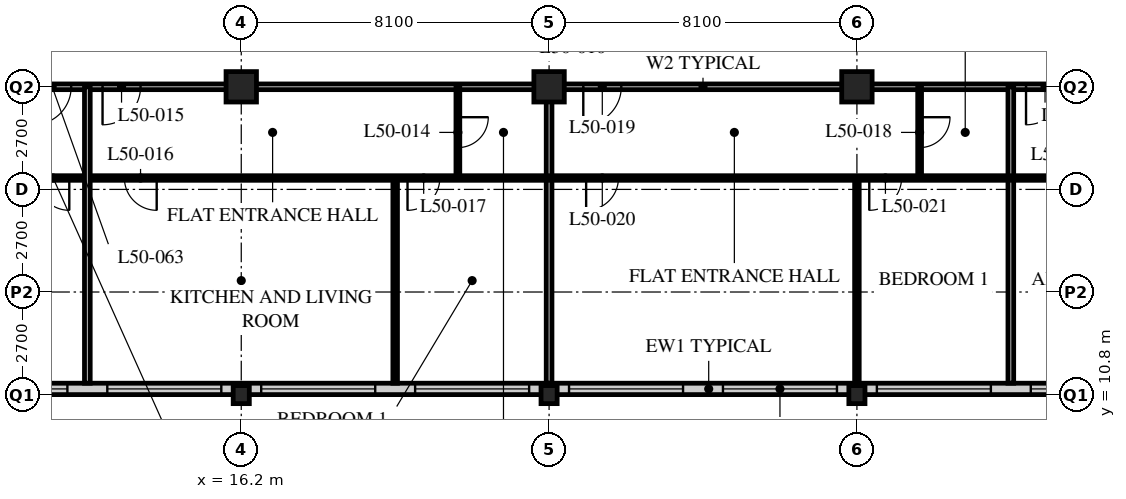
"""IFC4 building model, lengths in metres.
Left out: names, types, materials, properties, quantities, classifications, styles, units other than length and angle.
Written with IfcOpenShell. Run it as: python <this file> out.ifc"""

import sys

from ifc_helpers import new_model, si_unit, direction, frame, frame_2d, origin, origin_2d, place, context, subcontext, project, spatial, rectangle, hollow_rectangle, i_section, extrude, element, fill, save


model = new_model("IFC4")
c1 = context("Model", 3, precision=1e-05, world=origin(), true_north=direction((0.0, 1.0)))
c2 = subcontext(c1, "Body", "Model", "MODEL_VIEW")
j1 = project(units=[si_unit("LENGTHUNIT", "METRE"), si_unit("PLANEANGLEUNIT", "RADIAN")], contexts=[c1])
p1 = place(None, origin())
s1 = spatial("IfcSite", under=j1, at=p1, CompositionType="ELEMENT")
p2 = place(p1, origin())
s2 = spatial("IfcBuilding", under=s1, at=p2, CompositionType="ELEMENT")
p3 = place(p2, frame((0.0, 0.0, 195.6)))
s3 = spatial("IfcBuildingStorey", under=s2, at=p3, CompositionType="ELEMENT", Elevation=195.6)
p4 = place(p3, frame((16.2, 10.8, 0.0), z_axis=(0.0, 0.0, 1.0), x_axis=(1.0, 0.0, 0.0)))
e1 = element("IfcColumn", 1, at=p4, inside=s3, PredefinedType="COLUMN", context=c2, shape_type="SweptSolid", body=[
    extrude(i_section(OverallWidth=0.424, OverallDepth=0.475, WebThickness=0.048, FlangeThickness=0.077, FilletRadius=0.015, at=origin_2d()), origin(), (0.0, 0.0, 1.0), 3.6),
])
p5 = place(p3, frame((16.2, 18.9, 0.0), z_axis=(0.0, 0.0, 1.0), x_axis=(1.0, 0.0, 0.0)))
e2 = element("IfcColumn", 2, at=p5, inside=s3, PredefinedType="COLUMN", context=c2, shape_type="SweptSolid", body=[
    extrude(hollow_rectangle(XDim=0.8, YDim=0.8, WallThickness=0.08, at=origin_2d()), origin(), (0.0, 0.0, 1.0), 3.6),
])
p6 = place(p3, frame((24.3, 10.8, 0.0), z_axis=(0.0, 0.0, 1.0), x_axis=(1.0, 0.0, 0.0)))
e3 = element("IfcColumn", 3, at=p6, inside=s3, PredefinedType="COLUMN", context=c2, shape_type="SweptSolid", body=[
    extrude(i_section(OverallWidth=0.424, OverallDepth=0.475, WebThickness=0.048, FlangeThickness=0.077, FilletRadius=0.015, at=origin_2d()), origin(), (0.0, 0.0, 1.0), 3.6),
])
p7 = place(p3, frame((24.3, 18.9, 0.0), z_axis=(0.0, 0.0, 1.0), x_axis=(1.0, 0.0, 0.0)))
e4 = element("IfcColumn", 4, at=p7, inside=s3, PredefinedType="COLUMN", context=c2, shape_type="SweptSolid", body=[
    extrude(hollow_rectangle(XDim=0.8, YDim=0.8, WallThickness=0.08, at=origin_2d()), origin(), (0.0, 0.0, 1.0), 3.6),
])
p8 = place(p3, frame((32.4, 10.8, 0.0), z_axis=(0.0, 0.0, 1.0), x_axis=(1.0, 0.0, 0.0)))
e5 = element("IfcColumn", 5, at=p8, inside=s3, PredefinedType="COLUMN", context=c2, shape_type="SweptSolid", body=[
    extrude(i_section(OverallWidth=0.424, OverallDepth=0.475, WebThickness=0.048, FlangeThickness=0.077, FilletRadius=0.015, at=origin_2d()), origin(), (0.0, 0.0, 1.0), 3.6),
])
p9 = place(p3, frame((32.4, 18.9, 0.0), z_axis=(0.0, 0.0, 1.0), x_axis=(1.0, 0.0, 0.0)))
e6 = element("IfcColumn", 6, at=p9, inside=s3, PredefinedType="COLUMN", context=c2, shape_type="SweptSolid", body=[
    extrude(hollow_rectangle(XDim=0.8, YDim=0.8, WallThickness=0.08, at=origin_2d()), origin(), (0.0, 0.0, 1.0), 3.6),
])
p10 = place(p3, frame((8.4, 10.95, 0.0), z_axis=(0.0, 0.0, 1.0), x_axis=(1.0, 0.0, 0.0)))
e7 = element("IfcWall", 7, at=p10, inside=s3, PredefinedType="SOLIDWALL", context=c2, shape_type="SweptSolid", body=[
    extrude(rectangle(XDim=40.2, YDim=0.3, at=frame_2d((20.1, 0.0))), origin(), (0.0, 0.0, 1.0), 3.39),
])
p11 = place(p10, frame((0.225, 0.0, 0.6)))
e8 = element("IfcOpeningElement", 8, at=p11, cuts=e7, PredefinedType="OPENING", context=c2, shape_type="SweptSolid", body=[
    extrude(rectangle(XDim=3.0, YDim=2.4, at=frame_2d((1.5, 1.2))), frame((0.0, 0.16, 0.0), z_axis=(0.0, -1.0, 0.0), x_axis=(1.0, 0.0, 0.0)), (0.0, 0.0, 1.0), 0.32),
])
p12 = place(p10, frame((4.275, 0.0, 0.6)))
e9 = element("IfcOpeningElement", 9, at=p12, cuts=e7, PredefinedType="OPENING", context=c2, shape_type="SweptSolid", body=[
    extrude(rectangle(XDim=3.0, YDim=2.4, at=frame_2d((1.5, 1.2))), frame((0.0, 0.16, 0.0), z_axis=(0.0, -1.0, 0.0), x_axis=(1.0, 0.0, 0.0)), (0.0, 0.0, 1.0), 0.32),
])
p13 = place(p10, frame((8.325, 0.0, 0.6)))
e10 = element("IfcOpeningElement", 10, at=p13, cuts=e7, PredefinedType="OPENING", context=c2, shape_type="SweptSolid", body=[
    extrude(rectangle(XDim=3.0, YDim=2.4, at=frame_2d((1.5, 1.2))), frame((0.0, 0.16, 0.0), z_axis=(0.0, -1.0, 0.0), x_axis=(1.0, 0.0, 0.0)), (0.0, 0.0, 1.0), 0.32),
])
p14 = place(p10, frame((12.375, 0.0, 0.6)))
e11 = element("IfcOpeningElement", 11, at=p14, cuts=e7, PredefinedType="OPENING", context=c2, shape_type="SweptSolid", body=[
    extrude(rectangle(XDim=3.0, YDim=2.4, at=frame_2d((1.5, 1.2))), frame((0.0, 0.16, 0.0), z_axis=(0.0, -1.0, 0.0), x_axis=(1.0, 0.0, 0.0)), (0.0, 0.0, 1.0), 0.32),
])
p15 = place(p10, frame((16.425, 0.0, 0.6)))
e12 = element("IfcOpeningElement", 12, at=p15, cuts=e7, PredefinedType="OPENING", context=c2, shape_type="SweptSolid", body=[
    extrude(rectangle(XDim=3.0, YDim=2.4, at=frame_2d((1.5, 1.2))), frame((0.0, 0.16, 0.0), z_axis=(0.0, -1.0, 0.0), x_axis=(1.0, 0.0, 0.0)), (0.0, 0.0, 1.0), 0.32),
])
p16 = place(p10, frame((20.475, 0.0, 0.6)))
e13 = element("IfcOpeningElement", 13, at=p16, cuts=e7, PredefinedType="OPENING", context=c2, shape_type="SweptSolid", body=[
    extrude(rectangle(XDim=3.0, YDim=2.4, at=frame_2d((1.5, 1.2))), frame((0.0, 0.16, 0.0), z_axis=(0.0, -1.0, 0.0), x_axis=(1.0, 0.0, 0.0)), (0.0, 0.0, 1.0), 0.32),
])
p17 = place(p10, frame((24.525, 0.0, 0.6)))
e14 = element("IfcOpeningElement", 14, at=p17, cuts=e7, PredefinedType="OPENING", context=c2, shape_type="SweptSolid", body=[
    extrude(rectangle(XDim=3.0, YDim=2.4, at=frame_2d((1.5, 1.2))), frame((0.0, 0.16, 0.0), z_axis=(0.0, -1.0, 0.0), x_axis=(1.0, 0.0, 0.0)), (0.0, 0.0, 1.0), 0.32),
])
p18 = place(p10, frame((28.575, 0.0, 0.6)))
e15 = element("IfcOpeningElement", 15, at=p18, cuts=e7, PredefinedType="OPENING", context=c2, shape_type="SweptSolid", body=[
    extrude(rectangle(XDim=3.0, YDim=2.4, at=frame_2d((1.5, 1.2))), frame((0.0, 0.16, 0.0), z_axis=(0.0, -1.0, 0.0), x_axis=(1.0, 0.0, 0.0)), (0.0, 0.0, 1.0), 0.32),
])
p19 = place(p10, frame((32.625, 0.0, 0.6)))
e16 = element("IfcOpeningElement", 16, at=p19, cuts=e7, PredefinedType="OPENING", context=c2, shape_type="SweptSolid", body=[
    extrude(rectangle(XDim=3.0, YDim=2.4, at=frame_2d((1.5, 1.2))), frame((0.0, 0.16, 0.0), z_axis=(0.0, -1.0, 0.0), x_axis=(1.0, 0.0, 0.0)), (0.0, 0.0, 1.0), 0.32),
])
p20 = place(p10, frame((36.675, 0.0, 0.6)))
e17 = element("IfcOpeningElement", 17, at=p20, cuts=e7, PredefinedType="OPENING", context=c2, shape_type="SweptSolid", body=[
    extrude(rectangle(XDim=3.0, YDim=2.4, at=frame_2d((1.5, 1.2))), frame((0.0, 0.16, 0.0), z_axis=(0.0, -1.0, 0.0), x_axis=(1.0, 0.0, 0.0)), (0.0, 0.0, 1.0), 0.32),
])
p21 = place(p3, frame((8.1, 18.9, 0.0), z_axis=(0.0, 0.0, 1.0), x_axis=(1.0, 0.0, 0.0)))
e18 = element("IfcWall", 18, at=p21, inside=s3, PredefinedType="PARTITIONING", context=c2, shape_type="SweptSolid", body=[
    extrude(rectangle(XDim=40.5, YDim=0.15, at=frame_2d((20.25, 0.0))), origin(), (0.0, 0.0, 1.0), 2.778),
])
p22 = place(p21, frame((4.45, 0.0, 0.0)))
e19 = element("IfcOpeningElement", 19, at=p22, cuts=e18, PredefinedType="OPENING", context=c2, shape_type="SweptSolid", body=[
    extrude(rectangle(XDim=1.0, YDim=2.1, at=frame_2d((0.5, 1.05))), frame((0.0, 0.085, 0.0), z_axis=(0.0, -1.0, 0.0), x_axis=(1.0, 0.0, 0.0)), (0.0, 0.0, 1.0), 0.17),
])
p23 = place(p21, frame((17.1, 0.0, 0.0)))
e20 = element("IfcOpeningElement", 20, at=p23, cuts=e18, PredefinedType="OPENING", context=c2, shape_type="SweptSolid", body=[
    extrude(rectangle(XDim=1.0, YDim=2.1, at=frame_2d((0.5, 1.05))), frame((0.0, 0.085, 0.0), z_axis=(0.0, -1.0, 0.0), x_axis=(1.0, 0.0, 0.0)), (0.0, 0.0, 1.0), 0.17),
])
p24 = place(p21, frame((28.75, 0.0, 0.0)))
e21 = element("IfcOpeningElement", 21, at=p24, cuts=e18, PredefinedType="OPENING", context=c2, shape_type="SweptSolid", body=[
    extrude(rectangle(XDim=1.0, YDim=2.1, at=frame_2d((0.5, 1.05))), frame((0.0, 0.085, 0.0), z_axis=(0.0, -1.0, 0.0), x_axis=(1.0, 0.0, 0.0)), (0.0, 0.0, 1.0), 0.17),
])
p25 = place(p21, frame((2.625, 0.0, 0.0)))
e22 = element("IfcOpeningElement", 22, at=p25, cuts=e18, PredefinedType="OPENING", context=c2, shape_type="SweptSolid", body=[
    extrude(rectangle(XDim=1.0, YDim=2.1, at=frame_2d((0.5, 1.05))), frame((0.0, 0.085, 0.0), z_axis=(0.0, -1.0, 0.0), x_axis=(1.0, 0.0, 0.0)), (0.0, 0.0, 1.0), 0.17),
])
p26 = place(p21, frame((36.875, 0.0, 0.0)))
e23 = element("IfcOpeningElement", 23, at=p26, cuts=e18, PredefinedType="OPENING", context=c2, shape_type="SweptSolid", body=[
    extrude(rectangle(XDim=1.0, YDim=2.1, at=frame_2d((0.5, 1.05))), frame((0.0, 0.085, 0.0), z_axis=(0.0, -1.0, 0.0), x_axis=(1.0, 0.0, 0.0)), (0.0, 0.0, 1.0), 0.17),
])
p27 = place(p3, frame((21.9, 18.9, 0.0), z_axis=(0.0, 0.0, 1.0), x_axis=(0.0, -1.0, 0.0)))
e24 = element("IfcWall", 24, at=p27, inside=s3, PredefinedType="PARTITIONING", context=c2, shape_type="SweptSolid", body=[
    extrude(rectangle(XDim=2.4, YDim=0.1, at=frame_2d((1.2, 0.0))), origin(), (0.0, 0.0, 1.0), 3.39),
])
p28 = place(p27, frame((0.8, 0.0, 0.0)))
e25 = element("IfcOpeningElement", 25, at=p28, cuts=e24, PredefinedType="OPENING", context=c2, shape_type="SweptSolid", body=[
    extrude(rectangle(XDim=0.8, YDim=2.1, at=frame_2d((0.4, 1.05))), frame((0.0, 0.06, 0.0), z_axis=(0.0, -1.0, 0.0), x_axis=(1.0, 0.0, 0.0)), (0.0, 0.0, 1.0), 0.12),
])
p29 = place(p3, frame((20.25, 16.5, 0.0), z_axis=(0.0, 0.0, 1.0), x_axis=(0.0, -1.0, 0.0)))
e26 = element("IfcWall", 26, at=p29, inside=s3, PredefinedType="PARTITIONING", context=c2, shape_type="SweptSolid", body=[
    extrude(rectangle(XDim=5.4, YDim=0.12, at=frame_2d((2.7, 0.0))), origin(), (0.0, 0.0, 1.0), 3.39),
])
p30 = place(p3, frame((24.3, 18.9, 0.0), z_axis=(0.0, 0.0, 1.0), x_axis=(0.0, -1.0, 0.0)))
e27 = element("IfcWall", 27, at=p30, inside=s3, PredefinedType="PARTITIONING", context=c2, shape_type="SweptSolid", body=[
    extrude(rectangle(XDim=7.8, YDim=0.15, at=frame_2d((3.9, 0.0))), origin(), (0.0, 0.0, 1.0), 2.778),
])
p31 = place(p3, frame((34.05, 18.9, 0.0), z_axis=(0.0, 0.0, 1.0), x_axis=(0.0, -1.0, 0.0)))
e28 = element("IfcWall", 28, at=p31, inside=s3, PredefinedType="PARTITIONING", context=c2, shape_type="SweptSolid", body=[
    extrude(rectangle(XDim=2.4, YDim=0.1, at=frame_2d((1.2, 0.0))), origin(), (0.0, 0.0, 1.0), 3.39),
])
p32 = place(p31, frame((0.8, 0.0, 0.0)))
e29 = element("IfcOpeningElement", 29, at=p32, cuts=e28, PredefinedType="OPENING", context=c2, shape_type="SweptSolid", body=[
    extrude(rectangle(XDim=0.8, YDim=2.1, at=frame_2d((0.4, 1.05))), frame((0.0, 0.06, 0.0), z_axis=(0.0, -1.0, 0.0), x_axis=(1.0, 0.0, 0.0)), (0.0, 0.0, 1.0), 0.12),
])
p33 = place(p3, frame((32.4, 16.5, 0.0), z_axis=(0.0, 0.0, 1.0), x_axis=(0.0, -1.0, 0.0)))
e30 = element("IfcWall", 30, at=p33, inside=s3, PredefinedType="PARTITIONING", context=c2, shape_type="SweptSolid", body=[
    extrude(rectangle(XDim=5.4, YDim=0.12, at=frame_2d((2.7, 0.0))), origin(), (0.0, 0.0, 1.0), 2.778),
])
p34 = place(p3, frame((36.45, 18.9, 0.0), z_axis=(0.0, 0.0, 1.0), x_axis=(0.0, -1.0, 0.0)))
e31 = element("IfcWall", 31, at=p34, inside=s3, PredefinedType="PARTITIONING", context=c2, shape_type="SweptSolid", body=[
    extrude(rectangle(XDim=7.8, YDim=0.15, at=frame_2d((3.9, 0.0))), origin(), (0.0, 0.0, 1.0), 3.39),
])
p35 = place(p3, frame((8.1, 16.5, 0.0), z_axis=(0.0, 0.0, 1.0), x_axis=(1.0, 0.0, 0.0)))
e32 = element("IfcWall", 32, at=p35, inside=s3, PredefinedType="PARTITIONING", context=c2, shape_type="SweptSolid", body=[
    extrude(rectangle(XDim=40.5, YDim=0.12, at=frame_2d((20.25, 0.0))), origin(), (0.0, 0.0, 1.0), 3.39),
])
p36 = place(p35, frame((5.025, 0.0, 0.0)))
e33 = element("IfcOpeningElement", 33, at=p36, cuts=e32, PredefinedType="OPENING", context=c2, shape_type="SweptSolid", body=[
    extrude(rectangle(XDim=0.85, YDim=2.1, at=frame_2d((0.425, 1.05))), frame((0.0, 0.07, 0.0), z_axis=(0.0, -1.0, 0.0), x_axis=(1.0, 0.0, 0.0)), (0.0, 0.0, 1.0), 0.14),
])
p37 = place(p35, frame((12.475, 0.0, 0.0)))
e34 = element("IfcOpeningElement", 34, at=p37, cuts=e32, PredefinedType="OPENING", context=c2, shape_type="SweptSolid", body=[
    extrude(rectangle(XDim=0.85, YDim=2.1, at=frame_2d((0.425, 1.05))), frame((0.0, 0.07, 0.0), z_axis=(0.0, -1.0, 0.0), x_axis=(1.0, 0.0, 0.0)), (0.0, 0.0, 1.0), 0.14),
])
p38 = place(p35, frame((17.175, 0.0, 0.0)))
e35 = element("IfcOpeningElement", 35, at=p38, cuts=e32, PredefinedType="OPENING", context=c2, shape_type="SweptSolid", body=[
    extrude(rectangle(XDim=0.85, YDim=2.1, at=frame_2d((0.425, 1.05))), frame((0.0, 0.07, 0.0), z_axis=(0.0, -1.0, 0.0), x_axis=(1.0, 0.0, 0.0)), (0.0, 0.0, 1.0), 0.14),
])
p39 = place(p35, frame((24.625, 0.0, 0.0)))
e36 = element("IfcOpeningElement", 36, at=p39, cuts=e32, PredefinedType="OPENING", context=c2, shape_type="SweptSolid", body=[
    extrude(rectangle(XDim=0.85, YDim=2.1, at=frame_2d((0.425, 1.05))), frame((0.0, 0.07, 0.0), z_axis=(0.0, -1.0, 0.0), x_axis=(1.0, 0.0, 0.0)), (0.0, 0.0, 1.0), 0.14),
])
p40 = place(p35, frame((29.325, 0.0, 0.0)))
e37 = element("IfcOpeningElement", 37, at=p40, cuts=e32, PredefinedType="OPENING", context=c2, shape_type="SweptSolid", body=[
    extrude(rectangle(XDim=0.85, YDim=2.1, at=frame_2d((0.425, 1.05))), frame((0.0, 0.07, 0.0), z_axis=(0.0, -1.0, 0.0), x_axis=(1.0, 0.0, 0.0)), (0.0, 0.0, 1.0), 0.14),
])
p41 = place(p35, frame((32.725, 0.0, 0.0)))
e38 = element("IfcOpeningElement", 38, at=p41, cuts=e32, PredefinedType="OPENING", context=c2, shape_type="SweptSolid", body=[
    extrude(rectangle(XDim=0.85, YDim=2.1, at=frame_2d((0.425, 1.05))), frame((0.0, 0.07, 0.0), z_axis=(0.0, -1.0, 0.0), x_axis=(1.0, 0.0, 0.0)), (0.0, 0.0, 1.0), 0.14),
])
p42 = place(p35, frame((2.725, 0.0, 0.0)))
e39 = element("IfcOpeningElement", 39, at=p42, cuts=e32, PredefinedType="OPENING", context=c2, shape_type="SweptSolid", body=[
    extrude(rectangle(XDim=0.85, YDim=2.1, at=frame_2d((0.425, 1.05))), frame((0.0, 0.07, 0.0), z_axis=(0.0, -1.0, 0.0), x_axis=(1.0, 0.0, 0.0)), (0.0, 0.0, 1.0), 0.14),
])
p43 = place(p35, frame((36.925, 0.0, 0.0)))
e40 = element("IfcOpeningElement", 40, at=p43, cuts=e32, PredefinedType="OPENING", context=c2, shape_type="SweptSolid", body=[
    extrude(rectangle(XDim=0.85, YDim=2.1, at=frame_2d((0.425, 1.05))), frame((0.0, 0.07, 0.0), z_axis=(0.0, -1.0, 0.0), x_axis=(1.0, 0.0, 0.0)), (0.0, 0.0, 1.0), 0.14),
])
p44 = place(p3, frame((12.15, 18.9, 0.0), z_axis=(0.0, 0.0, 1.0), x_axis=(0.0, -1.0, 0.0)))
e41 = element("IfcWall", 41, at=p44, inside=s3, PredefinedType="PARTITIONING", context=c2, shape_type="SweptSolid", body=[
    extrude(rectangle(XDim=7.8, YDim=0.15, at=frame_2d((3.9, 0.0))), origin(), (0.0, 0.0, 1.0), 3.39),
])
p45 = place(p11, origin())
e42 = element("IfcWindow", 42, at=p45, inside=s3, PartitioningType="SINGLE_PANEL", PredefinedType="WINDOW", context=c2, shape_type="SweptSolid", body=[
    extrude(rectangle(XDim=3.0, YDim=2.4, at=frame_2d((1.5, 1.2))), frame((0.0, 0.03, 0.0), z_axis=(0.0, -1.0, 0.0), x_axis=(1.0, 0.0, 0.0)), (0.0, 0.0, 1.0), 0.06),
])
fill(e8, e42)
p46 = place(p12, origin())
e43 = element("IfcWindow", 43, at=p46, inside=s3, PartitioningType="SINGLE_PANEL", PredefinedType="WINDOW", context=c2, shape_type="SweptSolid", body=[
    extrude(rectangle(XDim=3.0, YDim=2.4, at=frame_2d((1.5, 1.2))), frame((0.0, 0.03, 0.0), z_axis=(0.0, -1.0, 0.0), x_axis=(1.0, 0.0, 0.0)), (0.0, 0.0, 1.0), 0.06),
])
fill(e9, e43)
p47 = place(p13, origin())
e44 = element("IfcWindow", 44, at=p47, inside=s3, PartitioningType="SINGLE_PANEL", PredefinedType="WINDOW", context=c2, shape_type="SweptSolid", body=[
    extrude(rectangle(XDim=3.0, YDim=2.4, at=frame_2d((1.5, 1.2))), frame((0.0, 0.03, 0.0), z_axis=(0.0, -1.0, 0.0), x_axis=(1.0, 0.0, 0.0)), (0.0, 0.0, 1.0), 0.06),
])
fill(e10, e44)
p48 = place(p14, origin())
e45 = element("IfcWindow", 45, at=p48, inside=s3, PartitioningType="SINGLE_PANEL", PredefinedType="WINDOW", context=c2, shape_type="SweptSolid", body=[
    extrude(rectangle(XDim=3.0, YDim=2.4, at=frame_2d((1.5, 1.2))), frame((0.0, 0.03, 0.0), z_axis=(0.0, -1.0, 0.0), x_axis=(1.0, 0.0, 0.0)), (0.0, 0.0, 1.0), 0.06),
])
fill(e11, e45)
p49 = place(p15, origin())
e46 = element("IfcWindow", 46, at=p49, inside=s3, PartitioningType="SINGLE_PANEL", PredefinedType="WINDOW", context=c2, shape_type="SweptSolid", body=[
    extrude(rectangle(XDim=3.0, YDim=2.4, at=frame_2d((1.5, 1.2))), frame((0.0, 0.03, 0.0), z_axis=(0.0, -1.0, 0.0), x_axis=(1.0, 0.0, 0.0)), (0.0, 0.0, 1.0), 0.06),
])
fill(e12, e46)
p50 = place(p16, origin())
e47 = element("IfcWindow", 47, at=p50, inside=s3, PartitioningType="SINGLE_PANEL", PredefinedType="WINDOW", context=c2, shape_type="SweptSolid", body=[
    extrude(rectangle(XDim=3.0, YDim=2.4, at=frame_2d((1.5, 1.2))), frame((0.0, 0.03, 0.0), z_axis=(0.0, -1.0, 0.0), x_axis=(1.0, 0.0, 0.0)), (0.0, 0.0, 1.0), 0.06),
])
fill(e13, e47)
p51 = place(p17, origin())
e48 = element("IfcWindow", 48, at=p51, inside=s3, PartitioningType="SINGLE_PANEL", PredefinedType="WINDOW", context=c2, shape_type="SweptSolid", body=[
    extrude(rectangle(XDim=3.0, YDim=2.4, at=frame_2d((1.5, 1.2))), frame((0.0, 0.03, 0.0), z_axis=(0.0, -1.0, 0.0), x_axis=(1.0, 0.0, 0.0)), (0.0, 0.0, 1.0), 0.06),
])
fill(e14, e48)
p52 = place(p18, origin())
e49 = element("IfcWindow", 49, at=p52, inside=s3, PartitioningType="SINGLE_PANEL", PredefinedType="WINDOW", context=c2, shape_type="SweptSolid", body=[
    extrude(rectangle(XDim=3.0, YDim=2.4, at=frame_2d((1.5, 1.2))), frame((0.0, 0.03, 0.0), z_axis=(0.0, -1.0, 0.0), x_axis=(1.0, 0.0, 0.0)), (0.0, 0.0, 1.0), 0.06),
])
fill(e15, e49)
p53 = place(p28, origin())
e50 = element("IfcDoor", 50, at=p53, inside=s3, OperationType="SINGLE_SWING_LEFT", PredefinedType="DOOR", context=c2, shape_type="SweptSolid", body=[
    extrude(rectangle(XDim=0.8, YDim=2.1, at=frame_2d((0.4, 1.05))), frame((0.0, 0.025, 0.0), z_axis=(0.0, -1.0, 0.0), x_axis=(1.0, 0.0, 0.0)), (0.0, 0.0, 1.0), 0.05),
])
fill(e25, e50)
p54 = place(p22, origin())
e51 = element("IfcDoor", 51, at=p54, inside=s3, OperationType="SINGLE_SWING_RIGHT", PredefinedType="DOOR", context=c2, shape_type="SweptSolid", body=[
    extrude(rectangle(XDim=1.0, YDim=2.1, at=frame_2d((0.5, 1.05))), frame((0.0, 0.025, 0.0), z_axis=(0.0, -1.0, 0.0), x_axis=(1.0, 0.0, 0.0)), (0.0, 0.0, 1.0), 0.05),
])
fill(e19, e51)
p55 = place(p36, origin())
e52 = element("IfcDoor", 52, at=p55, inside=s3, OperationType="SINGLE_SWING_LEFT", PredefinedType="DOOR", context=c2, shape_type="SweptSolid", body=[
    extrude(rectangle(XDim=0.85, YDim=2.1, at=frame_2d((0.425, 1.05))), frame((0.0, 0.025, 0.0), z_axis=(0.0, -1.0, 0.0), x_axis=(1.0, 0.0, 0.0)), (0.0, 0.0, 1.0), 0.05),
])
fill(e33, e52)
p56 = place(p37, origin())
e53 = element("IfcDoor", 53, at=p56, inside=s3, OperationType="SINGLE_SWING_RIGHT", PredefinedType="DOOR", context=c2, shape_type="SweptSolid", body=[
    extrude(rectangle(XDim=0.85, YDim=2.1, at=frame_2d((0.425, 1.05))), frame((0.0, 0.025, 0.0), z_axis=(0.0, -1.0, 0.0), x_axis=(1.0, 0.0, 0.0)), (0.0, 0.0, 1.0), 0.05),
])
fill(e34, e53)
p57 = place(p32, origin())
e54 = element("IfcDoor", 54, at=p57, inside=s3, OperationType="SINGLE_SWING_LEFT", PredefinedType="DOOR", context=c2, shape_type="SweptSolid", body=[
    extrude(rectangle(XDim=0.8, YDim=2.1, at=frame_2d((0.4, 1.05))), frame((0.0, 0.025, 0.0), z_axis=(0.0, -1.0, 0.0), x_axis=(1.0, 0.0, 0.0)), (0.0, 0.0, 1.0), 0.05),
])
fill(e29, e54)
p58 = place(p23, origin())
e55 = element("IfcDoor", 55, at=p58, inside=s3, OperationType="SINGLE_SWING_RIGHT", PredefinedType="DOOR", context=c2, shape_type="SweptSolid", body=[
    extrude(rectangle(XDim=1.0, YDim=2.1, at=frame_2d((0.5, 1.05))), frame((0.0, 0.025, 0.0), z_axis=(0.0, -1.0, 0.0), x_axis=(1.0, 0.0, 0.0)), (0.0, 0.0, 1.0), 0.05),
])
fill(e20, e55)
p59 = place(p38, origin())
e56 = element("IfcDoor", 56, at=p59, inside=s3, OperationType="SINGLE_SWING_RIGHT", PredefinedType="DOOR", context=c2, shape_type="SweptSolid", body=[
    extrude(rectangle(XDim=0.85, YDim=2.1, at=frame_2d((0.425, 1.05))), frame((0.0, 0.025, 0.0), z_axis=(0.0, -1.0, 0.0), x_axis=(1.0, 0.0, 0.0)), (0.0, 0.0, 1.0), 0.05),
])
fill(e35, e56)
p60 = place(p39, origin())
e57 = element("IfcDoor", 57, at=p60, inside=s3, OperationType="SINGLE_SWING_RIGHT", PredefinedType="DOOR", context=c2, shape_type="SweptSolid", body=[
    extrude(rectangle(XDim=0.85, YDim=2.1, at=frame_2d((0.425, 1.05))), frame((0.0, 0.025, 0.0), z_axis=(0.0, -1.0, 0.0), x_axis=(1.0, 0.0, 0.0)), (0.0, 0.0, 1.0), 0.05),
])
fill(e36, e57)
p61 = place(p24, origin())
e58 = element("IfcDoor", 58, at=p61, inside=s3, OperationType="SINGLE_SWING_RIGHT", PredefinedType="DOOR", context=c2, shape_type="SweptSolid", body=[
    extrude(rectangle(XDim=1.0, YDim=2.1, at=frame_2d((0.5, 1.05))), frame((0.0, 0.025, 0.0), z_axis=(0.0, -1.0, 0.0), x_axis=(1.0, 0.0, 0.0)), (0.0, 0.0, 1.0), 0.05),
])
fill(e21, e58)
p62 = place(p25, origin())
e59 = element("IfcDoor", 59, at=p62, inside=s3, OperationType="SINGLE_SWING_RIGHT", PredefinedType="DOOR", context=c2, shape_type="SweptSolid", body=[
    extrude(rectangle(XDim=1.0, YDim=2.1, at=frame_2d((0.5, 1.05))), frame((0.0, 0.025, 0.0), z_axis=(0.0, -1.0, 0.0), x_axis=(1.0, 0.0, 0.0)), (0.0, 0.0, 1.0), 0.05),
])
fill(e22, e59)
p63 = place(p42, origin())
e60 = element("IfcDoor", 60, at=p63, inside=s3, OperationType="SINGLE_SWING_LEFT", PredefinedType="DOOR", context=c2, shape_type="SweptSolid", body=[
    extrude(rectangle(XDim=0.85, YDim=2.1, at=frame_2d((0.425, 1.05))), frame((0.0, 0.025, 0.0), z_axis=(0.0, -1.0, 0.0), x_axis=(1.0, 0.0, 0.0)), (0.0, 0.0, 1.0), 0.05),
])
fill(e39, e60)
save(model, sys.argv[1])
